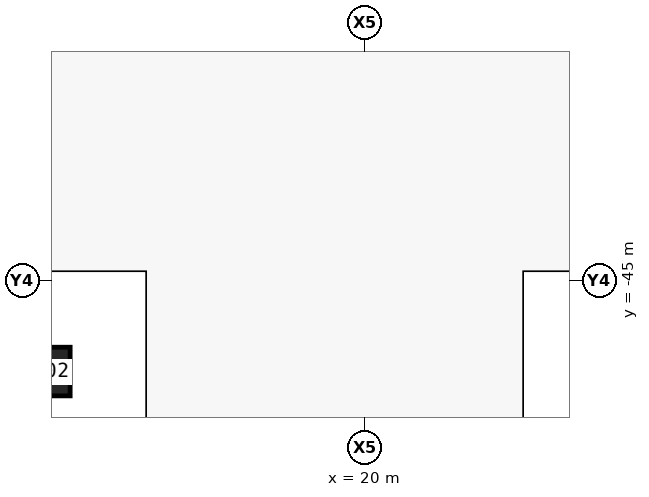
"""IFC4 building model, lengths in metres.
Left out: names, types, materials, properties, quantities, classifications, styles, units other than length and angle.
Written with IfcOpenShell. Run it as: python <this file> out.ifc"""

import sys

from ifc_helpers import new_model, si_unit, direction, frame, origin, origin_2d, place, context, subcontext, project, spatial, rectangle, extrude, element, save


model = new_model("IFC4")
c1 = context("Model", 3, precision=1e-05, world=origin(), true_north=direction((0.0, 1.0)))
c2 = subcontext(c1, "Body", "Model", "MODEL_VIEW")
j1 = project(units=[si_unit("LENGTHUNIT", "METRE"), si_unit("PLANEANGLEUNIT", "RADIAN")], contexts=[c1])
p1 = place(None, origin())
s1 = spatial("IfcSite", under=j1, at=p1, CompositionType="ELEMENT")
p2 = place(p1, origin())
s2 = spatial("IfcBuilding", under=s1, at=p2, CompositionType="ELEMENT")
p3 = place(p2, frame((0.0, 0.0, -9.0)))
s3 = spatial("IfcBuildingStorey", under=s2, at=p3, CompositionType="ELEMENT", Elevation=-9.0)
p4 = place(p3, frame((9.5, -48.0, 0.0), z_axis=(0.0, 0.0, 1.0), x_axis=(1.0, 0.0, 0.0)))
e1 = element("IfcColumn", 1, at=p4, inside=s3, PredefinedType="COLUMN", context=c2, shape_type="SweptSolid", body=[
    extrude(rectangle(XDim=1.6, YDim=1.6, at=origin_2d()), origin(), (0.0, 0.0, 1.0), 4.5),
])
save(model, sys.argv[1])
